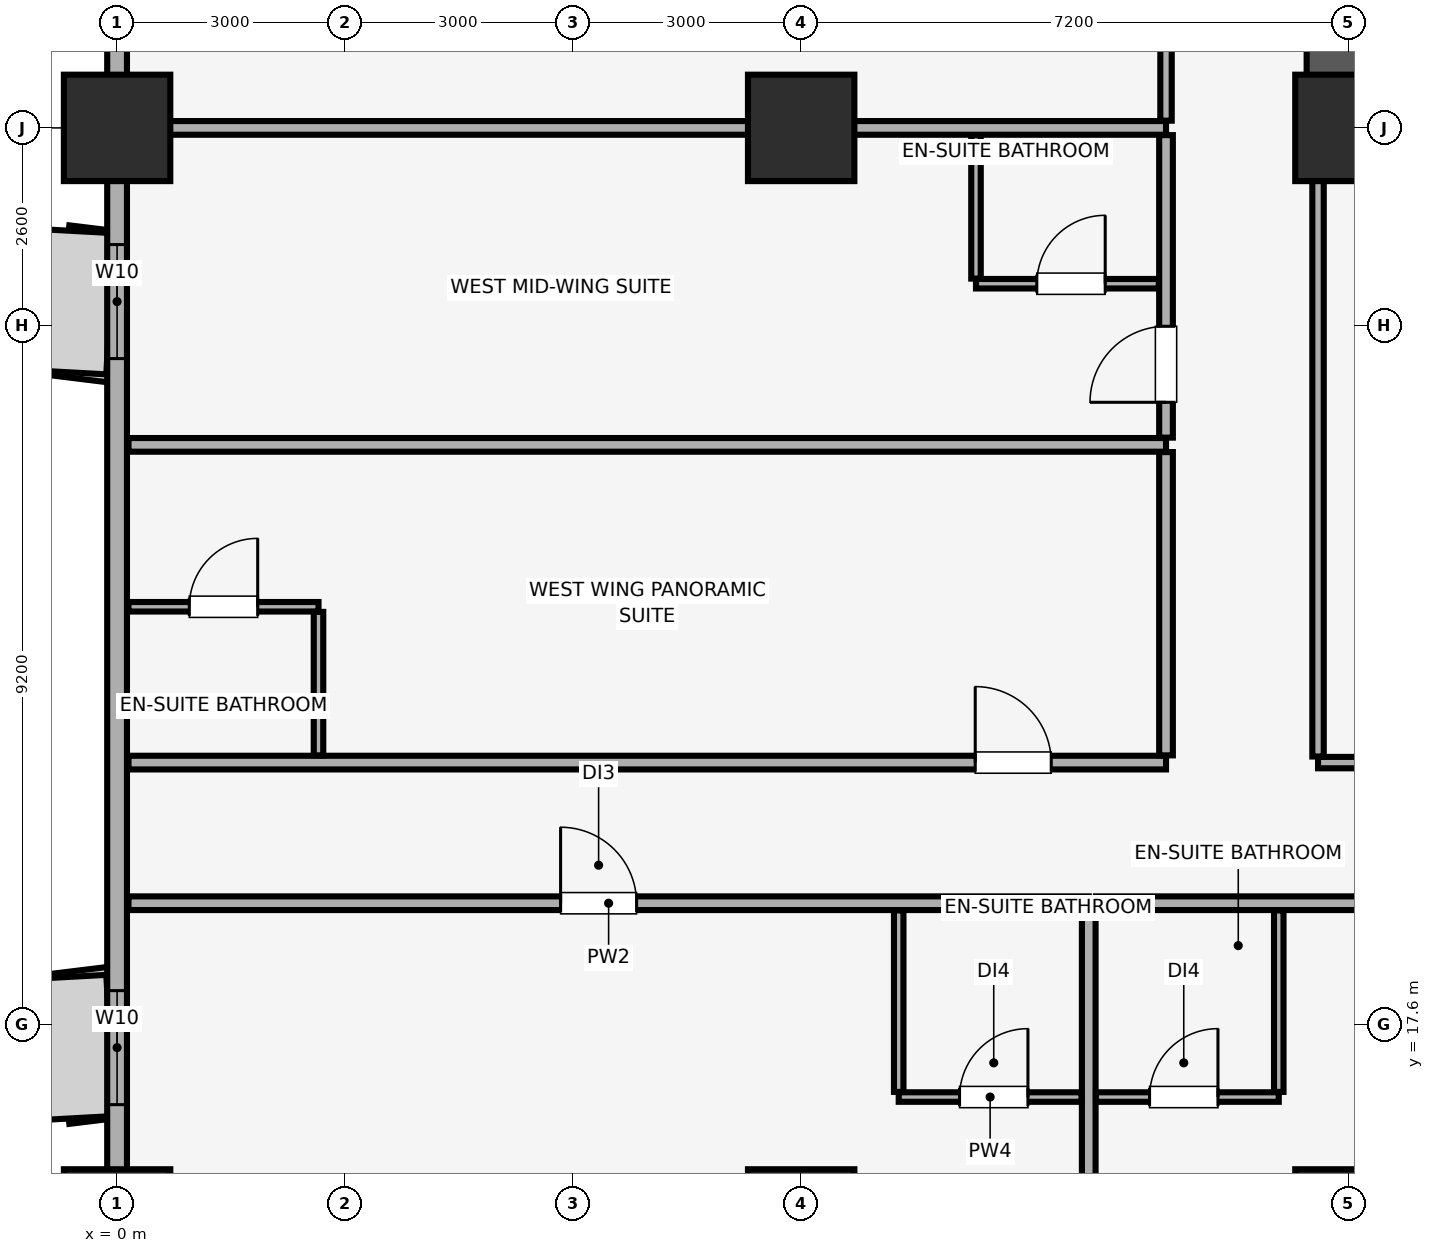
"""IFC4 building model, lengths in metres.
Left out: names, types, materials, properties, quantities, classifications, styles, units other than length and angle.
Written with IfcOpenShell. Run it as: python <this file> out.ifc"""

import sys

from ifc_helpers import new_model, si_unit, direction, frame, frame_2d, origin, origin_2d, place, context, subcontext, project, spatial, rectangle, extrude, element, fill, save


model = new_model("IFC4")
c1 = context("Model", 3, precision=1e-05, world=origin(), true_north=direction((0.0, 1.0)))
c2 = subcontext(c1, "Body", "Model", "MODEL_VIEW")
j1 = project(units=[si_unit("LENGTHUNIT", "METRE"), si_unit("PLANEANGLEUNIT", "RADIAN")], contexts=[c1])
p1 = place(None, origin())
s1 = spatial("IfcSite", under=j1, at=p1, CompositionType="ELEMENT")
p2 = place(p1, origin())
s2 = spatial("IfcBuilding", under=s1, at=p2, CompositionType="ELEMENT")
p3 = place(p2, frame((0.0, 0.0, 72.65)))
s3 = spatial("IfcBuildingStorey", under=s2, at=p3, CompositionType="ELEMENT", Elevation=72.65)
for number, where, z_axis, x_axis in (
    (1, (0.0, 15.0, 0.0), (0.0, 0.0, 1.0), (1.0, 0.0, 0.0)),
    (2, (0.0, 29.4, 0.0), (0.0, 0.0, 1.0), (1.0, 0.0, 0.0)),
    (3, (9.0, 15.0, 0.0), (0.0, 0.0, 1.0), (1.0, 0.0, 0.0)),
    (4, (16.2, 15.0, 0.0), (0.0, 0.0, 1.0), (1.0, 0.0, 0.0)),
    (5, (9.0, 29.4, 0.0), (0.0, 0.0, 1.0), (1.0, 0.0, 0.0)),
    (6, (16.2, 29.4, 0.0), (0.0, 0.0, 1.0), (1.0, 0.0, 0.0)),
):
    element("IfcColumn", number, at=place(p3, frame(where, z_axis=z_axis, x_axis=x_axis)), inside=s3, PredefinedType="COLUMN", context=c2, shape_type="SweptSolid", body=[
        extrude(rectangle(XDim=1.4, YDim=1.4, at=origin_2d()), origin(), (0.0, 0.0, 1.0), 3.51),
    ])
p4 = place(p3, frame((0.0, 44.8, 0.0), z_axis=(0.0, 0.0, 1.0), x_axis=(0.0, -1.0, 0.0)))
e7 = element("IfcWall", 7, at=p4, inside=s3, PredefinedType="SOLIDWALL", context=c2, shape_type="SweptSolid", body=[
    extrude(rectangle(XDim=40.6, YDim=0.26, at=frame_2d((20.3, 0.0))), origin(), (0.0, 0.0, 1.0), 2.56),
])
p5 = place(p4, frame((33.05, 0.0, 0.85)))
e8 = element("IfcOpeningElement", 8, at=p5, cuts=e7, PredefinedType="OPENING", context=c2, shape_type="SweptSolid", body=[
    extrude(rectangle(XDim=1.5, YDim=1.4, at=frame_2d((0.75, 0.7))), frame((0.0, 0.14, 0.0), z_axis=(0.0, -1.0, 0.0), x_axis=(1.0, 0.0, 0.0)), (0.0, 0.0, 1.0), 0.28),
])
p6 = place(p4, frame((26.75, 0.0, 0.85)))
e9 = element("IfcOpeningElement", 9, at=p6, cuts=e7, PredefinedType="OPENING", context=c2, shape_type="SweptSolid", body=[
    extrude(rectangle(XDim=1.5, YDim=1.4, at=frame_2d((0.75, 0.7))), frame((0.0, 0.14, 0.0), z_axis=(0.0, -1.0, 0.0), x_axis=(1.0, 0.0, 0.0)), (0.0, 0.0, 1.0), 0.28),
])
p7 = place(p4, frame((16.935, 0.0, 0.85)))
e10 = element("IfcOpeningElement", 10, at=p7, cuts=e7, PredefinedType="OPENING", context=c2, shape_type="SweptSolid", body=[
    extrude(rectangle(XDim=1.5, YDim=1.4, at=frame_2d((0.75, 0.7))), frame((0.0, 0.14, 0.0), z_axis=(0.0, -1.0, 0.0), x_axis=(1.0, 0.0, 0.0)), (0.0, 0.0, 1.0), 0.28),
])
p8 = place(p4, frame((11.05, 0.0, 0.85)))
e11 = element("IfcOpeningElement", 11, at=p8, cuts=e7, PredefinedType="OPENING", context=c2, shape_type="SweptSolid", body=[
    extrude(rectangle(XDim=1.5, YDim=1.4, at=frame_2d((0.75, 0.7))), frame((0.0, 0.14, 0.0), z_axis=(0.0, -1.0, 0.0), x_axis=(1.0, 0.0, 0.0)), (0.0, 0.0, 1.0), 0.28),
])
p9 = place(p4, frame((6.35, 0.0, 0.85)))
e12 = element("IfcOpeningElement", 12, at=p9, cuts=e7, PredefinedType="OPENING", context=c2, shape_type="SweptSolid", body=[
    extrude(rectangle(XDim=1.5, YDim=1.4, at=frame_2d((0.75, 0.7))), frame((0.0, 0.14, 0.0), z_axis=(0.0, -1.0, 0.0), x_axis=(1.0, 0.0, 0.0)), (0.0, 0.0, 1.0), 0.28),
])
p10 = place(p4, frame((1.735, 0.0, 0.85)))
e13 = element("IfcOpeningElement", 13, at=p10, cuts=e7, PredefinedType="OPENING", context=c2, shape_type="SweptSolid", body=[
    extrude(rectangle(XDim=1.5, YDim=1.4, at=frame_2d((0.75, 0.7))), frame((0.0, 0.14, 0.0), z_axis=(0.0, -1.0, 0.0), x_axis=(1.0, 0.0, 0.0)), (0.0, 0.0, 1.0), 0.28),
])
p11 = place(p3, frame((16.2, 29.4, 0.0), z_axis=(0.0, 0.0, 1.0), x_axis=(0.0, 1.0, 0.0)))
e14 = element("IfcWall", 14, at=p11, inside=s3, PredefinedType="SHEAR", context=c2, shape_type="SweptSolid", body=[
    extrude(rectangle(XDim=19.2, YDim=1.1, at=frame_2d((9.6, 0.0))), origin(), (0.0, 0.0, 1.0), 3.51),
])
p12 = place(p3, frame((0.15, 19.2, 0.0), z_axis=(0.0, 0.0, 1.0), x_axis=(1.0, 0.0, 0.0)))
e15 = element("IfcWall", 15, at=p12, inside=s3, PredefinedType="PARTITIONING", context=c2, shape_type="SweptSolid", body=[
    extrude(rectangle(XDim=12.633, YDim=0.18, at=frame_2d((6.317, 0.0))), origin(), (0.0, 0.0, 1.0), 3.51),
])
p13 = place(p12, frame((5.685, 0.0, 0.0)))
e16 = element("IfcOpeningElement", 16, at=p13, cuts=e15, PredefinedType="OPENING", context=c2, shape_type="SweptSolid", body=[
    extrude(rectangle(XDim=1.0, YDim=2.15, at=frame_2d((0.5, 1.075))), frame((0.0, 0.1, 0.0), z_axis=(0.0, -1.0, 0.0), x_axis=(1.0, 0.0, 0.0)), (0.0, 0.0, 1.0), 0.2),
])
p14 = place(p3, frame((12.783, 0.15, 0.0), z_axis=(0.0, 0.0, 1.0), x_axis=(0.0, 1.0, 0.0)))
e17 = element("IfcWall", 17, at=p14, inside=s3, PredefinedType="PARTITIONING", context=c2, shape_type="SweptSolid", body=[
    extrude(rectangle(XDim=18.955, YDim=0.18, at=frame_2d((9.478, 0.0))), origin(), (0.0, 0.0, 1.0), 2.898),
])
p15 = place(p3, frame((10.283, 16.65, 0.0), z_axis=(0.0, 0.0, 1.0), x_axis=(1.0, 0.0, 0.0)))
e18 = element("IfcWall", 18, at=p15, inside=s3, PredefinedType="PARTITIONING", context=c2, shape_type="SweptSolid", body=[
    extrude(rectangle(XDim=2.405, YDim=0.125, at=frame_2d((1.203, 0.0))), origin(), (0.0, 0.0, 1.0), 3.51),
])
p16 = place(p15, frame((0.8, 0.0, 0.0)))
e19 = element("IfcOpeningElement", 19, at=p16, cuts=e18, PredefinedType="OPENING", context=c2, shape_type="SweptSolid", body=[
    extrude(rectangle(XDim=0.9, YDim=2.1, at=frame_2d((0.45, 1.05))), frame((0.0, 0.073, 0.0), z_axis=(0.0, -1.0, 0.0), x_axis=(1.0, 0.0, 0.0)), (0.0, 0.0, 1.0), 0.145),
])
p17 = place(p3, frame((10.283, 16.718, 0.0), z_axis=(0.0, 0.0, 1.0), x_axis=(0.0, 1.0, 0.0)))
e20 = element("IfcWall", 20, at=p17, inside=s3, PredefinedType="PARTITIONING", context=c2, shape_type="SweptSolid", body=[
    extrude(rectangle(XDim=2.387, YDim=0.125, at=frame_2d((1.194, 0.0))), origin(), (0.0, 0.0, 1.0), 3.51),
])
p18 = place(p3, frame((12.878, 19.2, 0.0), z_axis=(0.0, 0.0, 1.0), x_axis=(1.0, 0.0, 0.0)))
e21 = element("IfcWall", 21, at=p18, inside=s3, PredefinedType="PARTITIONING", context=c2, shape_type="SweptSolid", body=[
    extrude(rectangle(XDim=8.238, YDim=0.18, at=frame_2d((4.119, 0.0))), origin(), (0.0, 0.0, 1.0), 3.51),
])
p19 = place(p18, frame((5.67, 0.0, 0.0)))
e22 = element("IfcOpeningElement", 22, at=p19, cuts=e21, PredefinedType="OPENING", context=c2, shape_type="SweptSolid", body=[
    extrude(rectangle(XDim=1.0, YDim=2.15, at=frame_2d((0.5, 1.075))), frame((0.0, 0.1, 0.0), z_axis=(0.0, -1.0, 0.0), x_axis=(1.0, 0.0, 0.0)), (0.0, 0.0, 1.0), 0.2),
])
p20 = place(p3, frame((12.878, 16.65, 0.0), z_axis=(0.0, 0.0, 1.0), x_axis=(1.0, 0.0, 0.0)))
e23 = element("IfcWall", 23, at=p20, inside=s3, PredefinedType="PARTITIONING", context=c2, shape_type="SweptSolid", body=[
    extrude(rectangle(XDim=2.405, YDim=0.125, at=frame_2d((1.202, 0.0))), origin(), (0.0, 0.0, 1.0), 3.51),
])
p21 = place(p20, frame((0.705, 0.0, 0.0)))
e24 = element("IfcOpeningElement", 24, at=p21, cuts=e23, PredefinedType="OPENING", context=c2, shape_type="SweptSolid", body=[
    extrude(rectangle(XDim=0.9, YDim=2.1, at=frame_2d((0.45, 1.05))), frame((0.0, 0.073, 0.0), z_axis=(0.0, -1.0, 0.0), x_axis=(1.0, 0.0, 0.0)), (0.0, 0.0, 1.0), 0.145),
])
p22 = place(p3, frame((15.283, 16.718, 0.0), z_axis=(0.0, 0.0, 1.0), x_axis=(0.0, 1.0, 0.0)))
e25 = element("IfcWall", 25, at=p22, inside=s3, PredefinedType="PARTITIONING", context=c2, shape_type="SweptSolid", body=[
    extrude(rectangle(XDim=2.387, YDim=0.125, at=frame_2d((1.194, 0.0))), origin(), (0.0, 0.0, 1.0), 3.51),
])
p23 = place(p3, frame((15.8, 21.05, 0.0), z_axis=(0.0, 0.0, 1.0), x_axis=(1.0, 0.0, 0.0)))
e26 = element("IfcWall", 26, at=p23, inside=s3, PredefinedType="PARTITIONING", context=c2, shape_type="SweptSolid", body=[
    extrude(rectangle(XDim=9.4, YDim=0.15, at=frame_2d((4.7, 0.0))), origin(), (0.0, 0.0, 1.0), 3.51),
])
p24 = place(p23, frame((4.2, 0.0, 0.0)))
e27 = element("IfcOpeningElement", 27, at=p24, cuts=e26, PredefinedType="OPENING", context=c2, shape_type="SweptSolid", body=[
    extrude(rectangle(XDim=1.0, YDim=2.15, at=frame_2d((0.5, 1.075))), frame((0.0, 0.085, 0.0), z_axis=(0.0, -1.0, 0.0), x_axis=(1.0, 0.0, 0.0)), (0.0, 0.0, 1.0), 0.17),
])
p25 = place(p3, frame((15.8, 21.13, 0.0), z_axis=(0.0, 0.0, 1.0), x_axis=(0.0, 1.0, 0.0)))
e28 = element("IfcWall", 28, at=p25, inside=s3, PredefinedType="PARTITIONING", context=c2, shape_type="SweptSolid", body=[
    extrude(rectangle(XDim=8.26, YDim=0.15, at=frame_2d((4.13, 0.0))), origin(), (0.0, 0.0, 1.0), 3.51),
])
p26 = place(p3, frame((0.15, 21.05, 0.0), z_axis=(0.0, 0.0, 1.0), x_axis=(1.0, 0.0, 0.0)))
e29 = element("IfcWall", 29, at=p26, inside=s3, PredefinedType="PARTITIONING", context=c2, shape_type="SweptSolid", body=[
    extrude(rectangle(XDim=13.65, YDim=0.18, at=frame_2d((6.825, 0.0))), origin(), (0.0, 0.0, 1.0), 3.51),
])
p27 = place(p26, frame((11.14, 0.0, 0.0)))
e30 = element("IfcOpeningElement", 30, at=p27, cuts=e29, PredefinedType="OPENING", context=c2, shape_type="SweptSolid", body=[
    extrude(rectangle(XDim=1.0, YDim=2.15, at=frame_2d((0.5, 1.075))), frame((0.0, 0.1, 0.0), z_axis=(0.0, -1.0, 0.0), x_axis=(1.0, 0.0, 0.0)), (0.0, 0.0, 1.0), 0.2),
])
p28 = place(p3, frame((0.15, 25.23, 0.0), z_axis=(0.0, 0.0, 1.0), x_axis=(1.0, 0.0, 0.0)))
e31 = element("IfcWall", 31, at=p28, inside=s3, PredefinedType="PARTITIONING", context=c2, shape_type="SweptSolid", body=[
    extrude(rectangle(XDim=13.65, YDim=0.18, at=frame_2d((6.825, 0.0))), origin(), (0.0, 0.0, 1.0), 3.51),
])
p29 = place(p3, frame((13.8, 21.145, 0.0), z_axis=(0.0, 0.0, 1.0), x_axis=(0.0, 1.0, 0.0)))
e32 = element("IfcWall", 32, at=p29, inside=s3, PredefinedType="PARTITIONING", context=c2, shape_type="SweptSolid", body=[
    extrude(rectangle(XDim=3.99, YDim=0.18, at=frame_2d((1.995, 0.0))), origin(), (0.0, 0.0, 1.0), 3.51),
])
p30 = place(p3, frame((0.15, 23.1, 0.0), z_axis=(0.0, 0.0, 1.0), x_axis=(1.0, 0.0, 0.0)))
e33 = element("IfcWall", 33, at=p30, inside=s3, PredefinedType="PARTITIONING", context=c2, shape_type="SweptSolid", body=[
    extrude(rectangle(XDim=2.5, YDim=0.125, at=frame_2d((1.25, 0.0))), origin(), (0.0, 0.0, 1.0), 3.51),
])
p31 = place(p30, frame((0.8, 0.0, 0.0)))
e34 = element("IfcOpeningElement", 34, at=p31, cuts=e33, PredefinedType="OPENING", context=c2, shape_type="SweptSolid", body=[
    extrude(rectangle(XDim=0.9, YDim=2.1, at=frame_2d((0.45, 1.05))), frame((0.0, 0.073, 0.0), z_axis=(0.0, -1.0, 0.0), x_axis=(1.0, 0.0, 0.0)), (0.0, 0.0, 1.0), 0.145),
])
p32 = place(p3, frame((2.65, 21.145, 0.0), z_axis=(0.0, 0.0, 1.0), x_axis=(0.0, 1.0, 0.0)))
e35 = element("IfcWall", 35, at=p32, inside=s3, PredefinedType="PARTITIONING", context=c2, shape_type="SweptSolid", body=[
    extrude(rectangle(XDim=1.887, YDim=0.125, at=frame_2d((0.944, 0.0))), origin(), (0.0, 0.0, 1.0), 3.51),
])
p33 = place(p3, frame((0.15, 29.4, 0.0), z_axis=(0.0, 0.0, 1.0), x_axis=(1.0, 0.0, 0.0)))
e36 = element("IfcWall", 36, at=p33, inside=s3, PredefinedType="PARTITIONING", context=c2, shape_type="SweptSolid", body=[
    extrude(rectangle(XDim=13.65, YDim=0.18, at=frame_2d((6.825, 0.0))), origin(), (0.0, 0.0, 1.0), 2.86),
])
p34 = place(p3, frame((13.8, 25.325, 0.0), z_axis=(0.0, 0.0, 1.0), x_axis=(0.0, 1.0, 0.0)))
e37 = element("IfcWall", 37, at=p34, inside=s3, PredefinedType="PARTITIONING", context=c2, shape_type="SweptSolid", body=[
    extrude(rectangle(XDim=3.98, YDim=0.18, at=frame_2d((1.99, 0.0))), origin(), (0.0, 0.0, 1.0), 3.51),
])
p35 = place(p34, frame((0.465, 0.0, 0.0)))
e38 = element("IfcOpeningElement", 38, at=p35, cuts=e37, PredefinedType="OPENING", context=c2, shape_type="SweptSolid", body=[
    extrude(rectangle(XDim=1.0, YDim=2.15, at=frame_2d((0.5, 1.075))), frame((0.0, 0.1, 0.0), z_axis=(0.0, -1.0, 0.0), x_axis=(1.0, 0.0, 0.0)), (0.0, 0.0, 1.0), 0.2),
])
p36 = place(p3, frame((11.3, 27.35, 0.0), z_axis=(0.0, 0.0, 1.0), x_axis=(1.0, 0.0, 0.0)))
e39 = element("IfcWall", 39, at=p36, inside=s3, PredefinedType="PARTITIONING", context=c2, shape_type="SweptSolid", body=[
    extrude(rectangle(XDim=2.405, YDim=0.125, at=frame_2d((1.203, 0.0))), origin(), (0.0, 0.0, 1.0), 3.51),
])
p37 = place(p36, frame((0.8, 0.0, 0.0)))
e40 = element("IfcOpeningElement", 40, at=p37, cuts=e39, PredefinedType="OPENING", context=c2, shape_type="SweptSolid", body=[
    extrude(rectangle(XDim=0.9, YDim=2.1, at=frame_2d((0.45, 1.05))), frame((0.0, 0.073, 0.0), z_axis=(0.0, -1.0, 0.0), x_axis=(1.0, 0.0, 0.0)), (0.0, 0.0, 1.0), 0.145),
])
p38 = place(p3, frame((11.3, 27.417, 0.0), z_axis=(0.0, 0.0, 1.0), x_axis=(0.0, 1.0, 0.0)))
e41 = element("IfcWall", 41, at=p38, inside=s3, PredefinedType="PARTITIONING", context=c2, shape_type="SweptSolid", body=[
    extrude(rectangle(XDim=1.887, YDim=0.125, at=frame_2d((0.944, 0.0))), origin(), (0.0, 0.0, 1.0), 3.51),
])
p39 = place(p3, frame((13.8, 29.495, 0.0), z_axis=(0.0, 0.0, 1.0), x_axis=(0.0, 1.0, 0.0)))
e42 = element("IfcWall", 42, at=p39, inside=s3, PredefinedType="PARTITIONING", context=c2, shape_type="SweptSolid", body=[
    extrude(rectangle(XDim=6.625, YDim=0.15, at=frame_2d((3.312, 0.0))), origin(), (0.0, 0.0, 1.0), 3.51),
])
p40 = place(p39, frame((2.805, 0.0, 0.0)))
e43 = element("IfcOpeningElement", 43, at=p40, cuts=e42, PredefinedType="OPENING", context=c2, shape_type="SweptSolid", body=[
    extrude(rectangle(XDim=1.0, YDim=2.15, at=frame_2d((0.5, 1.075))), frame((0.0, 0.085, 0.0), z_axis=(0.0, -1.0, 0.0), x_axis=(1.0, 0.0, 0.0)), (0.0, 0.0, 1.0), 0.17),
])
p41 = place(p6, origin())
e44 = element("IfcWindow", 44, at=p41, inside=s3, PartitioningType="SINGLE_PANEL", PredefinedType="WINDOW", context=c2, shape_type="SweptSolid", body=[
    extrude(rectangle(XDim=1.5, YDim=1.4, at=frame_2d((0.75, 0.7))), frame((0.0, 0.03, 0.0), z_axis=(0.0, -1.0, 0.0), x_axis=(1.0, 0.0, 0.0)), (0.0, 0.0, 1.0), 0.06),
])
fill(e9, e44)
p42 = place(p7, origin())
e45 = element("IfcWindow", 45, at=p42, inside=s3, PartitioningType="SINGLE_PANEL", PredefinedType="WINDOW", context=c2, shape_type="SweptSolid", body=[
    extrude(rectangle(XDim=1.5, YDim=1.4, at=frame_2d((0.75, 0.7))), frame((0.0, 0.03, 0.0), z_axis=(0.0, -1.0, 0.0), x_axis=(1.0, 0.0, 0.0)), (0.0, 0.0, 1.0), 0.06),
])
fill(e10, e45)
p43 = place(p13, origin())
e46 = element("IfcDoor", 46, at=p43, inside=s3, OperationType="SINGLE_SWING_LEFT", PredefinedType="DOOR", context=c2, shape_type="SweptSolid", body=[
    extrude(rectangle(XDim=1.0, YDim=2.15, at=frame_2d((0.5, 1.075))), frame((0.0, 0.025, 0.0), z_axis=(0.0, -1.0, 0.0), x_axis=(1.0, 0.0, 0.0)), (0.0, 0.0, 1.0), 0.05),
])
fill(e16, e46)
p44 = place(p16, origin())
e47 = element("IfcDoor", 47, at=p44, inside=s3, OperationType="SINGLE_SWING_RIGHT", PredefinedType="DOOR", context=c2, shape_type="SweptSolid", body=[
    extrude(rectangle(XDim=0.9, YDim=2.1, at=frame_2d((0.45, 1.05))), frame((0.0, 0.025, 0.0), z_axis=(0.0, -1.0, 0.0), x_axis=(1.0, 0.0, 0.0)), (0.0, 0.0, 1.0), 0.05),
])
fill(e19, e47)
p45 = place(p21, origin())
e48 = element("IfcDoor", 48, at=p45, inside=s3, OperationType="SINGLE_SWING_RIGHT", PredefinedType="DOOR", context=c2, shape_type="SweptSolid", body=[
    extrude(rectangle(XDim=0.9, YDim=2.1, at=frame_2d((0.45, 1.05))), frame((0.0, 0.025, 0.0), z_axis=(0.0, -1.0, 0.0), x_axis=(1.0, 0.0, 0.0)), (0.0, 0.0, 1.0), 0.05),
])
fill(e24, e48)
p46 = place(p27, origin())
e49 = element("IfcDoor", 49, at=p46, inside=s3, OperationType="SINGLE_SWING_LEFT", PredefinedType="DOOR", context=c2, shape_type="SweptSolid", body=[
    extrude(rectangle(XDim=1.0, YDim=2.15, at=frame_2d((0.5, 1.075))), frame((0.0, 0.025, 0.0), z_axis=(0.0, -1.0, 0.0), x_axis=(1.0, 0.0, 0.0)), (0.0, 0.0, 1.0), 0.05),
])
fill(e30, e49)
p47 = place(p31, origin())
e50 = element("IfcDoor", 50, at=p47, inside=s3, OperationType="SINGLE_SWING_RIGHT", PredefinedType="DOOR", context=c2, shape_type="SweptSolid", body=[
    extrude(rectangle(XDim=0.9, YDim=2.1, at=frame_2d((0.45, 1.05))), frame((0.0, 0.025, 0.0), z_axis=(0.0, -1.0, 0.0), x_axis=(1.0, 0.0, 0.0)), (0.0, 0.0, 1.0), 0.05),
])
fill(e34, e50)
p48 = place(p35, origin())
e51 = element("IfcDoor", 51, at=p48, inside=s3, OperationType="SINGLE_SWING_LEFT", PredefinedType="DOOR", context=c2, shape_type="SweptSolid", body=[
    extrude(rectangle(XDim=1.0, YDim=2.15, at=frame_2d((0.5, 1.075))), frame((0.0, 0.025, 0.0), z_axis=(0.0, -1.0, 0.0), x_axis=(1.0, 0.0, 0.0)), (0.0, 0.0, 1.0), 0.05),
])
fill(e38, e51)
p49 = place(p37, origin())
e52 = element("IfcDoor", 52, at=p49, inside=s3, OperationType="SINGLE_SWING_RIGHT", PredefinedType="DOOR", context=c2, shape_type="SweptSolid", body=[
    extrude(rectangle(XDim=0.9, YDim=2.1, at=frame_2d((0.45, 1.05))), frame((0.0, 0.025, 0.0), z_axis=(0.0, -1.0, 0.0), x_axis=(1.0, 0.0, 0.0)), (0.0, 0.0, 1.0), 0.05),
])
fill(e40, e52)
save(model, sys.argv[1])
